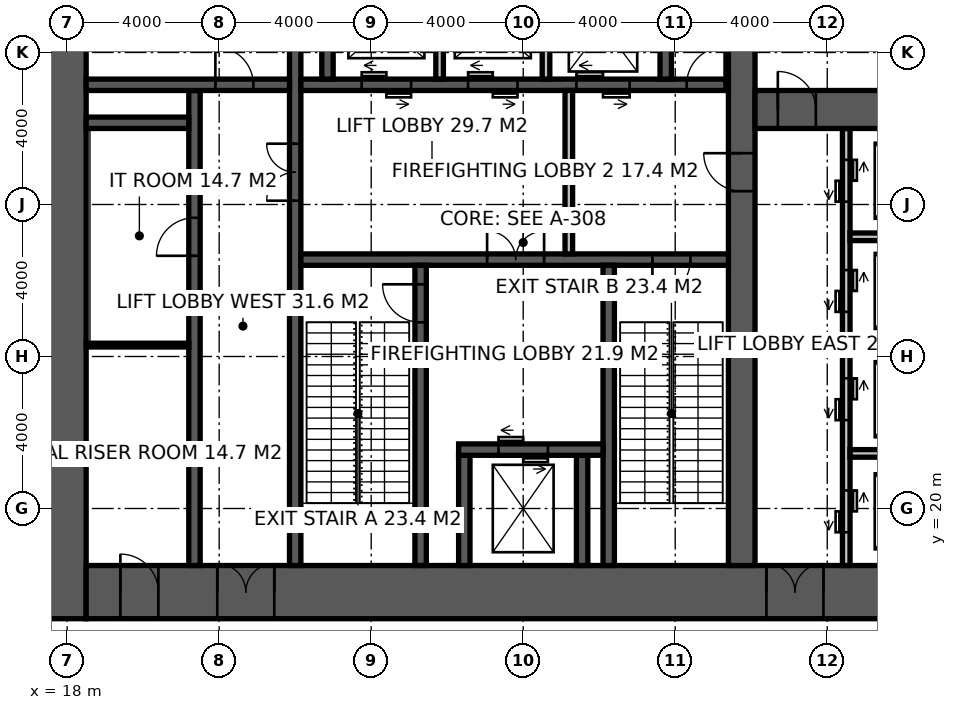
"""IFC4 building model, lengths in metres.
Left out: names, types, materials, properties, quantities, classifications, styles, units other than length and angle.
Written with IfcOpenShell. Run it as: python <this file> out.ifc"""

import sys

from ifc_helpers import new_model, si_unit, direction, frame, frame_2d, origin, place, context, subcontext, project, spatial, rectangle, extrude, element, fill, save


model = new_model("IFC4")
c1 = context("Model", 3, precision=1e-05, world=origin(), true_north=direction((0.0, 1.0)))
c2 = subcontext(c1, "Body", "Model", "MODEL_VIEW")
j1 = project(units=[si_unit("LENGTHUNIT", "METRE"), si_unit("PLANEANGLEUNIT", "RADIAN")], contexts=[c1])
p1 = place(None, origin())
s1 = spatial("IfcSite", under=j1, at=p1, CompositionType="ELEMENT")
p2 = place(p1, origin())
s2 = spatial("IfcBuilding", under=s1, at=p2, CompositionType="ELEMENT")
p3 = place(p2, origin())
s3 = spatial("IfcBuildingStorey", under=s2, at=p3, CompositionType="ELEMENT", Elevation=0.0)
p4 = place(p3, frame((18.0, 17.1, -0.3), z_axis=(0.0, 0.0, 1.0), x_axis=(0.0, 1.0, 0.0)))
e1 = element("IfcWall", 1, at=p4, inside=s3, PredefinedType="SHEAR", context=c2, shape_type="SweptSolid", body=[
    extrude(rectangle(XDim=19.8, YDim=1.0, at=frame_2d((9.9, 0.0))), origin(), (0.0, 0.0, 1.0), 6.15),
])
p5 = place(p3, frame((18.5, 17.8, -0.3), z_axis=(0.0, 0.0, 1.0), x_axis=(1.0, 0.0, 0.0)))
e2 = element("IfcWall", 2, at=p5, inside=s3, PredefinedType="SHEAR", context=c2, shape_type="SweptSolid", body=[
    extrude(rectangle(XDim=23.0, YDim=1.4, at=frame_2d((11.5, 0.0))), origin(), (0.0, 0.0, 1.0), 6.15),
])
p6 = place(p5, frame((3.45, 0.0, 0.3)))
e3 = element("IfcOpeningElement", 3, at=p6, cuts=e2, PredefinedType="OPENING", context=c2, shape_type="SweptSolid", body=[
    extrude(rectangle(XDim=1.5, YDim=2.4, at=frame_2d((0.75, 1.2))), frame((0.0, 0.71, 0.0), z_axis=(0.0, -1.0, 0.0), x_axis=(1.0, 0.0, 0.0)), (0.0, 0.0, 1.0), 1.42),
])
p7 = place(p5, frame((17.9, 0.0, 0.3)))
e4 = element("IfcOpeningElement", 4, at=p7, cuts=e2, PredefinedType="OPENING", context=c2, shape_type="SweptSolid", body=[
    extrude(rectangle(XDim=1.5, YDim=2.4, at=frame_2d((0.75, 1.2))), frame((0.0, 0.71, 0.0), z_axis=(0.0, -1.0, 0.0), x_axis=(1.0, 0.0, 0.0)), (0.0, 0.0, 1.0), 1.42),
])
p8 = place(p5, frame((0.9, 0.0, 0.3)))
e5 = element("IfcOpeningElement", 5, at=p8, cuts=e2, PredefinedType="OPENING", context=c2, shape_type="SweptSolid", body=[
    extrude(rectangle(XDim=1.0, YDim=2.2, at=frame_2d((0.5, 1.1))), frame((0.0, 0.71, 0.0), z_axis=(0.0, -1.0, 0.0), x_axis=(1.0, 0.0, 0.0)), (0.0, 0.0, 1.0), 1.42),
])
p9 = place(p3, frame((35.75, 18.5, -0.3), z_axis=(0.0, 0.0, 1.0), x_axis=(0.0, 1.0, 0.0)))
e6 = element("IfcWall", 6, at=p9, inside=s3, PredefinedType="SHEAR", context=c2, shape_type="SweptSolid", body=[
    extrude(rectangle(XDim=17.0, YDim=0.7, at=frame_2d((8.5, 0.0))), origin(), (0.0, 0.0, 1.0), 6.15),
])
p10 = place(p9, frame((9.85, 0.0, 0.3)))
e7 = element("IfcOpeningElement", 7, at=p10, cuts=e6, PredefinedType="OPENING", context=c2, shape_type="SweptSolid", body=[
    extrude(rectangle(XDim=1.0, YDim=2.2, at=frame_2d((0.5, 1.1))), frame((0.0, 0.36, 0.0), z_axis=(0.0, -1.0, 0.0), x_axis=(1.0, 0.0, 0.0)), (0.0, 0.0, 1.0), 0.72),
])
p11 = place(p3, frame((24.0, 18.5, -0.3), z_axis=(0.0, 0.0, 1.0), x_axis=(0.0, 1.0, 0.0)))
e8 = element("IfcWall", 8, at=p11, inside=s3, PredefinedType="SHEAR", context=c2, shape_type="SweptSolid", body=[
    extrude(rectangle(XDim=17.0, YDim=0.3, at=frame_2d((8.5, 0.0))), origin(), (0.0, 0.0, 1.0), 6.15),
])
p12 = place(p11, frame((9.6, 0.0, 0.3)))
e9 = element("IfcOpeningElement", 9, at=p12, cuts=e8, PredefinedType="OPENING", context=c2, shape_type="SweptSolid", body=[
    extrude(rectangle(XDim=1.5, YDim=2.4, at=frame_2d((0.75, 1.2))), frame((0.0, 0.16, 0.0), z_axis=(0.0, -1.0, 0.0), x_axis=(1.0, 0.0, 0.0)), (0.0, 0.0, 1.0), 0.32),
])
p13 = place(p3, frame((24.15, 26.55, -0.3), z_axis=(0.0, 0.0, 1.0), x_axis=(1.0, 0.0, 0.0)))
e10 = element("IfcWall", 10, at=p13, inside=s3, PredefinedType="SHEAR", context=c2, shape_type="SweptSolid", body=[
    extrude(rectangle(XDim=11.25, YDim=0.3, at=frame_2d((5.625, 0.0))), origin(), (0.0, 0.0, 1.0), 6.15),
])
p14 = place(p13, frame((9.25, 0.0, 0.3)))
e11 = element("IfcOpeningElement", 11, at=p14, cuts=e10, PredefinedType="OPENING", context=c2, shape_type="SweptSolid", body=[
    extrude(rectangle(XDim=1.0, YDim=2.2, at=frame_2d((0.5, 1.1))), frame((0.0, 0.16, 0.0), z_axis=(0.0, -1.0, 0.0), x_axis=(1.0, 0.0, 0.0)), (0.0, 0.0, 1.0), 0.32),
])
p15 = place(p13, frame((4.9, 0.0, 0.3)))
e12 = element("IfcOpeningElement", 12, at=p15, cuts=e10, PredefinedType="OPENING", context=c2, shape_type="SweptSolid", body=[
    extrude(rectangle(XDim=1.5, YDim=2.4, at=frame_2d((0.75, 1.2))), frame((0.0, 0.16, 0.0), z_axis=(0.0, -1.0, 0.0), x_axis=(1.0, 0.0, 0.0)), (0.0, 0.0, 1.0), 0.32),
])
p16 = place(p3, frame((27.3, 18.5, -0.3), z_axis=(0.0, 0.0, 1.0), x_axis=(0.0, 1.0, 0.0)))
e13 = element("IfcWall", 13, at=p16, inside=s3, PredefinedType="SHEAR", context=c2, shape_type="SweptSolid", body=[
    extrude(rectangle(XDim=7.9, YDim=0.3, at=frame_2d((3.95, 0.0))), origin(), (0.0, 0.0, 1.0), 6.15),
])
p17 = place(p16, frame((6.4, 0.0, 0.3)))
e14 = element("IfcOpeningElement", 14, at=p17, cuts=e13, PredefinedType="OPENING", context=c2, shape_type="SweptSolid", body=[
    extrude(rectangle(XDim=1.0, YDim=2.2, at=frame_2d((0.5, 1.1))), frame((0.0, 0.16, 0.0), z_axis=(0.0, -1.0, 0.0), x_axis=(1.0, 0.0, 0.0)), (0.0, 0.0, 1.0), 0.32),
])
p18 = place(p3, frame((32.25, 18.5, -0.3), z_axis=(0.0, 0.0, 1.0), x_axis=(0.0, 1.0, 0.0)))
e15 = element("IfcWall", 15, at=p18, inside=s3, PredefinedType="SHEAR", context=c2, shape_type="SweptSolid", body=[
    extrude(rectangle(XDim=7.9, YDim=0.3, at=frame_2d((3.95, 0.0))), origin(), (0.0, 0.0, 1.0), 6.15),
])
for number, where, z_axis, x_axis in (
    (16, (28.45, 18.5, -0.3), (0.0, 0.0, 1.0), (0.0, 1.0, 0.0)),
    (17, (31.55, 18.5, -0.3), (0.0, 0.0, 1.0), (0.0, 1.0, 0.0)),
):
    element("IfcWall", number, at=place(p3, frame(where, z_axis=z_axis, x_axis=x_axis)), inside=s3, PredefinedType="SHEAR", context=c2, shape_type="SweptSolid", body=[
        extrude(rectangle(XDim=2.9, YDim=0.3, at=frame_2d((1.45, 0.0))), origin(), (0.0, 0.0, 1.0), 6.15),
    ])
p19 = place(p3, frame((28.3, 21.55, -0.3), z_axis=(0.0, 0.0, 1.0), x_axis=(1.0, 0.0, 0.0)))
e18 = element("IfcWall", 18, at=p19, inside=s3, PredefinedType="SHEAR", context=c2, shape_type="SweptSolid", body=[
    extrude(rectangle(XDim=3.8, YDim=0.3, at=frame_2d((1.9, 0.0))), origin(), (0.0, 0.0, 1.0), 6.15),
])
p20 = place(p19, frame((1.05, 0.0, 0.3)))
e19 = element("IfcOpeningElement", 19, at=p20, cuts=e18, PredefinedType="OPENING", context=c2, shape_type="SweptSolid", body=[
    extrude(rectangle(XDim=1.3, YDim=2.4, at=frame_2d((0.65, 1.2))), frame((0.0, 0.16, 0.0), z_axis=(0.0, -1.0, 0.0), x_axis=(1.0, 0.0, 0.0)), (0.0, 0.0, 1.0), 0.32),
])
p21 = place(p3, frame((24.15, 31.15, -0.3), z_axis=(0.0, 0.0, 1.0), x_axis=(1.0, 0.0, 0.0)))
e20 = element("IfcWall", 20, at=p21, inside=s3, PredefinedType="SHEAR", context=c2, shape_type="SweptSolid", body=[
    extrude(rectangle(XDim=11.25, YDim=0.3, at=frame_2d((5.625, 0.0))), origin(), (0.0, 0.0, 1.0), 6.15),
])
p22 = place(p21, frame((10.15, 0.0, 0.3)))
e21 = element("IfcOpeningElement", 21, at=p22, cuts=e20, PredefinedType="OPENING", context=c2, shape_type="SweptSolid", body=[
    extrude(rectangle(XDim=1.0, YDim=2.2, at=frame_2d((0.5, 1.1))), frame((0.0, 0.16, 0.0), z_axis=(0.0, -1.0, 0.0), x_axis=(1.0, 0.0, 0.0)), (0.0, 0.0, 1.0), 0.32),
])
p23 = place(p21, frame((1.6, 0.0, 0.3)))
e22 = element("IfcOpeningElement", 22, at=p23, cuts=e20, PredefinedType="OPENING", context=c2, shape_type="SweptSolid", body=[
    extrude(rectangle(XDim=1.3, YDim=2.4, at=frame_2d((0.65, 1.2))), frame((0.0, 0.16, 0.0), z_axis=(0.0, -1.0, 0.0), x_axis=(1.0, 0.0, 0.0)), (0.0, 0.0, 1.0), 0.32),
])
p24 = place(p21, frame((4.4, 0.0, 0.3)))
e23 = element("IfcOpeningElement", 23, at=p24, cuts=e20, PredefinedType="OPENING", context=c2, shape_type="SweptSolid", body=[
    extrude(rectangle(XDim=1.3, YDim=2.4, at=frame_2d((0.65, 1.2))), frame((0.0, 0.16, 0.0), z_axis=(0.0, -1.0, 0.0), x_axis=(1.0, 0.0, 0.0)), (0.0, 0.0, 1.0), 0.32),
])
p25 = place(p21, frame((7.25, 0.0, 0.3)))
e24 = element("IfcOpeningElement", 24, at=p25, cuts=e20, PredefinedType="OPENING", context=c2, shape_type="SweptSolid", body=[
    extrude(rectangle(XDim=1.4, YDim=2.4, at=frame_2d((0.7, 1.2))), frame((0.0, 0.16, 0.0), z_axis=(0.0, -1.0, 0.0), x_axis=(1.0, 0.0, 0.0)), (0.0, 0.0, 1.0), 0.32),
])
p26 = place(p3, frame((21.35, 18.5, -0.3), z_axis=(0.0, 0.0, 1.0), x_axis=(0.0, 1.0, 0.0)))
e25 = element("IfcWall", 25, at=p26, inside=s3, PredefinedType="SHEAR", context=c2, shape_type="SweptSolid", body=[
    extrude(rectangle(XDim=12.5, YDim=0.3, at=frame_2d((6.25, 0.0))), origin(), (0.0, 0.0, 1.0), 6.15),
])
p27 = place(p26, frame((8.15, 0.0, 0.3)))
e26 = element("IfcOpeningElement", 26, at=p27, cuts=e25, PredefinedType="OPENING", context=c2, shape_type="SweptSolid", body=[
    extrude(rectangle(XDim=1.0, YDim=2.2, at=frame_2d((0.5, 1.1))), frame((0.0, 0.16, 0.0), z_axis=(0.0, -1.0, 0.0), x_axis=(1.0, 0.0, 0.0)), (0.0, 0.0, 1.0), 0.32),
])
p28 = place(p3, frame((18.5, 31.15, -0.3), z_axis=(0.0, 0.0, 1.0), x_axis=(1.0, 0.0, 0.0)))
e27 = element("IfcWall", 27, at=p28, inside=s3, PredefinedType="SHEAR", context=c2, shape_type="SweptSolid", body=[
    extrude(rectangle(XDim=5.35, YDim=0.3, at=frame_2d((2.675, 0.0))), origin(), (0.0, 0.0, 1.0), 6.15),
])
p29 = place(p28, frame((3.4, 0.0, 0.3)))
e28 = element("IfcOpeningElement", 28, at=p29, cuts=e27, PredefinedType="OPENING", context=c2, shape_type="SweptSolid", body=[
    extrude(rectangle(XDim=1.0, YDim=2.2, at=frame_2d((0.5, 1.1))), frame((0.0, 0.16, 0.0), z_axis=(0.0, -1.0, 0.0), x_axis=(1.0, 0.0, 0.0)), (0.0, 0.0, 1.0), 0.32),
])
p30 = place(p3, frame((18.5, 30.15, -0.3), z_axis=(0.0, 0.0, 1.0), x_axis=(1.0, 0.0, 0.0)))
e29 = element("IfcWall", 29, at=p30, inside=s3, PredefinedType="SHEAR", context=c2, shape_type="SweptSolid", body=[
    extrude(rectangle(XDim=2.7, YDim=0.3, at=frame_2d((1.35, 0.0))), origin(), (0.0, 0.0, 1.0), 6.15),
])
for number, where, z_axis, x_axis in (
    (30, (24.85, 31.3, -0.3), (0.0, 0.0, 1.0), (0.0, 1.0, 0.0)),
    (31, (33.75, 31.3, -0.3), (0.0, 0.0, 1.0), (0.0, 1.0, 0.0)),
):
    element("IfcWall", number, at=place(p3, frame(where, z_axis=z_axis, x_axis=x_axis)), inside=s3, PredefinedType="SHEAR", context=c2, shape_type="SweptSolid", body=[
        extrude(rectangle(XDim=4.2, YDim=0.3, at=frame_2d((2.1, 0.0))), origin(), (0.0, 0.0, 1.0), 6.15),
    ])
for number, where, z_axis, x_axis in (
    (32, (27.8, 31.3, -0.3), (0.0, 0.0, 1.0), (0.0, 1.0, 0.0)),
    (33, (30.6, 31.3, -0.3), (0.0, 0.0, 1.0), (0.0, 1.0, 0.0)),
):
    element("IfcWall", number, at=place(p3, frame(where, z_axis=z_axis, x_axis=x_axis)), inside=s3, PredefinedType="SOLIDWALL", context=c2, shape_type="SweptSolid", body=[
        extrude(rectangle(XDim=2.8, YDim=0.2, at=frame_2d((1.4, 0.0))), origin(), (0.0, 0.0, 1.0), 6.15),
    ])
p31 = place(p3, frame((38.5, 18.5, -0.3), z_axis=(0.0, 0.0, 1.0), x_axis=(0.0, 1.0, 0.0)))
e34 = element("IfcWall", 34, at=p31, inside=s3, PredefinedType="SOLIDWALL", context=c2, shape_type="SweptSolid", body=[
    extrude(rectangle(XDim=11.5, YDim=0.2, at=frame_2d((5.75, 0.0))), origin(), (0.0, 0.0, 1.0), 6.15),
])
p32 = place(p31, frame((0.875, 0.0, 0.3)))
e35 = element("IfcOpeningElement", 35, at=p32, cuts=e34, PredefinedType="OPENING", context=c2, shape_type="SweptSolid", body=[
    extrude(rectangle(XDim=1.1, YDim=2.2, at=frame_2d((0.55, 1.1))), frame((0.0, 0.11, 0.0), z_axis=(0.0, -1.0, 0.0), x_axis=(1.0, 0.0, 0.0)), (0.0, 0.0, 1.0), 0.22),
])
p33 = place(p31, frame((3.825, 0.0, 0.3)))
e36 = element("IfcOpeningElement", 36, at=p33, cuts=e34, PredefinedType="OPENING", context=c2, shape_type="SweptSolid", body=[
    extrude(rectangle(XDim=1.1, YDim=2.2, at=frame_2d((0.55, 1.1))), frame((0.0, 0.11, 0.0), z_axis=(0.0, -1.0, 0.0), x_axis=(1.0, 0.0, 0.0)), (0.0, 0.0, 1.0), 0.22),
])
p34 = place(p31, frame((6.675, 0.0, 0.3)))
e37 = element("IfcOpeningElement", 37, at=p34, cuts=e34, PredefinedType="OPENING", context=c2, shape_type="SweptSolid", body=[
    extrude(rectangle(XDim=1.1, YDim=2.2, at=frame_2d((0.55, 1.1))), frame((0.0, 0.11, 0.0), z_axis=(0.0, -1.0, 0.0), x_axis=(1.0, 0.0, 0.0)), (0.0, 0.0, 1.0), 0.22),
])
p35 = place(p31, frame((9.575, 0.0, 0.3)))
e38 = element("IfcOpeningElement", 38, at=p35, cuts=e34, PredefinedType="OPENING", context=c2, shape_type="SweptSolid", body=[
    extrude(rectangle(XDim=1.1, YDim=2.2, at=frame_2d((0.55, 1.1))), frame((0.0, 0.11, 0.0), z_axis=(0.0, -1.0, 0.0), x_axis=(1.0, 0.0, 0.0)), (0.0, 0.0, 1.0), 0.22),
])
p36 = place(p3, frame((36.1, 30.5, -0.3), z_axis=(0.0, 0.0, 1.0), x_axis=(1.0, 0.0, 0.0)))
e39 = element("IfcWall", 39, at=p36, inside=s3, PredefinedType="SHEAR", context=c2, shape_type="SweptSolid", body=[
    extrude(rectangle(XDim=5.4, YDim=1.0, at=frame_2d((2.7, 0.0))), origin(), (0.0, 0.0, 1.0), 6.15),
])
p37 = place(p36, frame((0.6, 0.0, 0.3)))
e40 = element("IfcOpeningElement", 40, at=p37, cuts=e39, PredefinedType="OPENING", context=c2, shape_type="SweptSolid", body=[
    extrude(rectangle(XDim=1.0, YDim=2.2, at=frame_2d((0.5, 1.1))), frame((0.0, 0.51, 0.0), z_axis=(0.0, -1.0, 0.0), x_axis=(1.0, 0.0, 0.0)), (0.0, 0.0, 1.0), 1.02),
])
for number, where, z_axis, x_axis in (
    (41, (38.6, 21.45, -0.3), (0.0, 0.0, 1.0), (1.0, 0.0, 0.0)),
    (42, (38.6, 24.3, -0.3), (0.0, 0.0, 1.0), (1.0, 0.0, 0.0)),
    (43, (38.6, 27.15, -0.3), (0.0, 0.0, 1.0), (1.0, 0.0, 0.0)),
):
    element("IfcWall", number, at=place(p3, frame(where, z_axis=z_axis, x_axis=x_axis)), inside=s3, PredefinedType="SOLIDWALL", context=c2, shape_type="SweptSolid", body=[
        extrude(rectangle(XDim=2.9, YDim=0.2, at=frame_2d((1.45, 0.0))), origin(), (0.0, 0.0, 1.0), 6.15),
    ])
p38 = place(p3, frame((31.2, 26.7, 0.0), z_axis=(0.0, 0.0, 1.0), x_axis=(0.0, 1.0, 0.0)))
e44 = element("IfcWall", 44, at=p38, inside=s3, PredefinedType="SOLIDWALL", context=c2, shape_type="SweptSolid", body=[
    extrude(rectangle(XDim=4.3, YDim=0.2, at=frame_2d((2.15, 0.0))), origin(), (0.0, 0.0, 1.0), 5.85),
])
p39 = place(p3, frame((18.5, 24.3, 0.0), z_axis=(0.0, 0.0, 1.0), x_axis=(1.0, 0.0, 0.0)))
e45 = element("IfcWall", 45, at=p39, inside=s3, PredefinedType="PARTITIONING", context=c2, shape_type="SweptSolid", body=[
    extrude(rectangle(XDim=2.7, YDim=0.1, at=frame_2d((1.35, 0.0))), origin(), (0.0, 0.0, 1.0), 5.85),
])
p40 = place(p17, origin())
e46 = element("IfcDoor", 46, at=p40, inside=s3, OperationType="SINGLE_SWING_RIGHT", PredefinedType="DOOR", context=c2, shape_type="SweptSolid", body=[
    extrude(rectangle(XDim=1.0, YDim=2.2, at=frame_2d((0.5, 1.1))), frame((0.0, 0.025, 0.0), z_axis=(0.0, -1.0, 0.0), x_axis=(1.0, 0.0, 0.0)), (0.0, 0.0, 1.0), 0.05),
])
fill(e14, e46)
p41 = place(p14, frame((1.0, 0.0, 0.0), z_axis=(0.0, 0.0, 1.0), x_axis=(-1.0, 0.0, 0.0)))
e47 = element("IfcDoor", 47, at=p41, inside=s3, OperationType="SINGLE_SWING_RIGHT", PredefinedType="DOOR", context=c2, shape_type="SweptSolid", body=[
    extrude(rectangle(XDim=1.0, YDim=2.2, at=frame_2d((0.5, 1.1))), frame((0.0, 0.025, 0.0), z_axis=(0.0, -1.0, 0.0), x_axis=(1.0, 0.0, 0.0)), (0.0, 0.0, 1.0), 0.05),
])
fill(e11, e47)
p42 = place(p10, origin())
e48 = element("IfcDoor", 48, at=p42, inside=s3, OperationType="SINGLE_SWING_RIGHT", PredefinedType="DOOR", context=c2, shape_type="SweptSolid", body=[
    extrude(rectangle(XDim=1.0, YDim=2.2, at=frame_2d((0.5, 1.1))), frame((0.0, 0.025, 0.0), z_axis=(0.0, -1.0, 0.0), x_axis=(1.0, 0.0, 0.0)), (0.0, 0.0, 1.0), 0.05),
])
fill(e7, e48)
p43 = place(p15, origin())
e49 = element("IfcDoor", 49, at=p43, inside=s3, OperationType="DOUBLE_DOOR_DOUBLE_SWING", PredefinedType="DOOR", context=c2, shape_type="SweptSolid", body=[
    extrude(rectangle(XDim=1.5, YDim=2.4, at=frame_2d((0.75, 1.2))), frame((0.0, 0.025, 0.0), z_axis=(0.0, -1.0, 0.0), x_axis=(1.0, 0.0, 0.0)), (0.0, 0.0, 1.0), 0.05),
])
fill(e12, e49)
p44 = place(p12, origin())
e50 = element("IfcDoor", 50, at=p44, inside=s3, OperationType="DOUBLE_DOOR_DOUBLE_SWING", PredefinedType="DOOR", context=c2, shape_type="SweptSolid", body=[
    extrude(rectangle(XDim=1.5, YDim=2.4, at=frame_2d((0.75, 1.2))), frame((0.0, 0.025, 0.0), z_axis=(0.0, -1.0, 0.0), x_axis=(1.0, 0.0, 0.0)), (0.0, 0.0, 1.0), 0.05),
])
fill(e9, e50)
p45 = place(p29, origin())
e51 = element("IfcDoor", 51, at=p45, inside=s3, OperationType="SINGLE_SWING_LEFT", PredefinedType="DOOR", context=c2, shape_type="SweptSolid", body=[
    extrude(rectangle(XDim=1.0, YDim=2.2, at=frame_2d((0.5, 1.1))), frame((0.0, 0.025, 0.0), z_axis=(0.0, -1.0, 0.0), x_axis=(1.0, 0.0, 0.0)), (0.0, 0.0, 1.0), 0.05),
])
fill(e28, e51)
p46 = place(p27, origin())
e52 = element("IfcDoor", 52, at=p46, inside=s3, OperationType="SINGLE_SWING_LEFT", PredefinedType="DOOR", context=c2, shape_type="SweptSolid", body=[
    extrude(rectangle(XDim=1.0, YDim=2.2, at=frame_2d((0.5, 1.1))), frame((0.0, 0.025, 0.0), z_axis=(0.0, -1.0, 0.0), x_axis=(1.0, 0.0, 0.0)), (0.0, 0.0, 1.0), 0.05),
])
fill(e26, e52)
p47 = place(p6, origin())
e53 = element("IfcDoor", 53, at=p47, inside=s3, OperationType="DOUBLE_DOOR_DOUBLE_SWING", PredefinedType="DOOR", context=c2, shape_type="SweptSolid", body=[
    extrude(rectangle(XDim=1.5, YDim=2.4, at=frame_2d((0.75, 1.2))), frame((0.0, 0.025, 0.0), z_axis=(0.0, -1.0, 0.0), x_axis=(1.0, 0.0, 0.0)), (0.0, 0.0, 1.0), 0.05),
])
fill(e3, e53)
p48 = place(p22, origin())
e54 = element("IfcDoor", 54, at=p48, inside=s3, OperationType="SINGLE_SWING_RIGHT", PredefinedType="DOOR", context=c2, shape_type="SweptSolid", body=[
    extrude(rectangle(XDim=1.0, YDim=2.2, at=frame_2d((0.5, 1.1))), frame((0.0, 0.025, 0.0), z_axis=(0.0, -1.0, 0.0), x_axis=(1.0, 0.0, 0.0)), (0.0, 0.0, 1.0), 0.05),
])
fill(e21, e54)
p49 = place(p7, origin())
e55 = element("IfcDoor", 55, at=p49, inside=s3, OperationType="DOUBLE_DOOR_DOUBLE_SWING", PredefinedType="DOOR", context=c2, shape_type="SweptSolid", body=[
    extrude(rectangle(XDim=1.5, YDim=2.4, at=frame_2d((0.75, 1.2))), frame((0.0, 0.025, 0.0), z_axis=(0.0, -1.0, 0.0), x_axis=(1.0, 0.0, 0.0)), (0.0, 0.0, 1.0), 0.05),
])
fill(e4, e55)
p50 = place(p37, origin())
e56 = element("IfcDoor", 56, at=p50, inside=s3, OperationType="SINGLE_SWING_LEFT", PredefinedType="DOOR", context=c2, shape_type="SweptSolid", body=[
    extrude(rectangle(XDim=1.0, YDim=2.2, at=frame_2d((0.5, 1.1))), frame((0.0, 0.025, 0.0), z_axis=(0.0, -1.0, 0.0), x_axis=(1.0, 0.0, 0.0)), (0.0, 0.0, 1.0), 0.05),
])
fill(e40, e56)
p51 = place(p8, origin())
e57 = element("IfcDoor", 57, at=p51, inside=s3, OperationType="SINGLE_SWING_LEFT", PredefinedType="DOOR", context=c2, shape_type="SweptSolid", body=[
    extrude(rectangle(XDim=1.0, YDim=2.2, at=frame_2d((0.5, 1.1))), frame((0.0, 0.025, 0.0), z_axis=(0.0, -1.0, 0.0), x_axis=(1.0, 0.0, 0.0)), (0.0, 0.0, 1.0), 0.05),
])
fill(e5, e57)
p52 = place(p20, origin())
e58 = element("IfcDoor", 58, at=p52, inside=s3, OperationType="DOUBLE_DOOR_SLIDING", PredefinedType="DOOR", context=c2, shape_type="SweptSolid", body=[
    extrude(rectangle(XDim=1.3, YDim=2.4, at=frame_2d((0.65, 1.2))), frame((0.0, 0.025, 0.0), z_axis=(0.0, -1.0, 0.0), x_axis=(1.0, 0.0, 0.0)), (0.0, 0.0, 1.0), 0.05),
])
fill(e19, e58)
p53 = place(p23, origin())
e59 = element("IfcDoor", 59, at=p53, inside=s3, OperationType="DOUBLE_DOOR_SLIDING", PredefinedType="DOOR", context=c2, shape_type="SweptSolid", body=[
    extrude(rectangle(XDim=1.3, YDim=2.4, at=frame_2d((0.65, 1.2))), frame((0.0, 0.025, 0.0), z_axis=(0.0, -1.0, 0.0), x_axis=(1.0, 0.0, 0.0)), (0.0, 0.0, 1.0), 0.05),
])
fill(e22, e59)
p54 = place(p24, origin())
e60 = element("IfcDoor", 60, at=p54, inside=s3, OperationType="DOUBLE_DOOR_SLIDING", PredefinedType="DOOR", context=c2, shape_type="SweptSolid", body=[
    extrude(rectangle(XDim=1.3, YDim=2.4, at=frame_2d((0.65, 1.2))), frame((0.0, 0.025, 0.0), z_axis=(0.0, -1.0, 0.0), x_axis=(1.0, 0.0, 0.0)), (0.0, 0.0, 1.0), 0.05),
])
fill(e23, e60)
p55 = place(p25, origin())
e61 = element("IfcDoor", 61, at=p55, inside=s3, OperationType="DOUBLE_DOOR_SLIDING", PredefinedType="DOOR", context=c2, shape_type="SweptSolid", body=[
    extrude(rectangle(XDim=1.4, YDim=2.4, at=frame_2d((0.7, 1.2))), frame((0.0, 0.025, 0.0), z_axis=(0.0, -1.0, 0.0), x_axis=(1.0, 0.0, 0.0)), (0.0, 0.0, 1.0), 0.05),
])
fill(e24, e61)
p56 = place(p32, origin())
e62 = element("IfcDoor", 62, at=p56, inside=s3, OperationType="DOUBLE_DOOR_SLIDING", PredefinedType="DOOR", context=c2, shape_type="SweptSolid", body=[
    extrude(rectangle(XDim=1.1, YDim=2.2, at=frame_2d((0.55, 1.1))), frame((0.0, 0.025, 0.0), z_axis=(0.0, -1.0, 0.0), x_axis=(1.0, 0.0, 0.0)), (0.0, 0.0, 1.0), 0.05),
])
fill(e35, e62)
p57 = place(p33, origin())
e63 = element("IfcDoor", 63, at=p57, inside=s3, OperationType="DOUBLE_DOOR_SLIDING", PredefinedType="DOOR", context=c2, shape_type="SweptSolid", body=[
    extrude(rectangle(XDim=1.1, YDim=2.2, at=frame_2d((0.55, 1.1))), frame((0.0, 0.025, 0.0), z_axis=(0.0, -1.0, 0.0), x_axis=(1.0, 0.0, 0.0)), (0.0, 0.0, 1.0), 0.05),
])
fill(e36, e63)
p58 = place(p34, origin())
e64 = element("IfcDoor", 64, at=p58, inside=s3, OperationType="DOUBLE_DOOR_SLIDING", PredefinedType="DOOR", context=c2, shape_type="SweptSolid", body=[
    extrude(rectangle(XDim=1.1, YDim=2.2, at=frame_2d((0.55, 1.1))), frame((0.0, 0.025, 0.0), z_axis=(0.0, -1.0, 0.0), x_axis=(1.0, 0.0, 0.0)), (0.0, 0.0, 1.0), 0.05),
])
fill(e37, e64)
p59 = place(p35, origin())
e65 = element("IfcDoor", 65, at=p59, inside=s3, OperationType="DOUBLE_DOOR_SLIDING", PredefinedType="DOOR", context=c2, shape_type="SweptSolid", body=[
    extrude(rectangle(XDim=1.1, YDim=2.2, at=frame_2d((0.55, 1.1))), frame((0.0, 0.025, 0.0), z_axis=(0.0, -1.0, 0.0), x_axis=(1.0, 0.0, 0.0)), (0.0, 0.0, 1.0), 0.05),
])
fill(e38, e65)
save(model, sys.argv[1])
